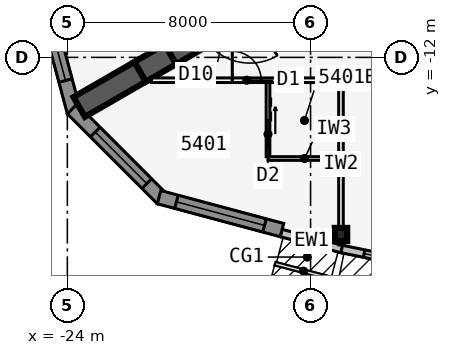
"""IFC4 building model, lengths in metres.
Left out: names, types, materials, properties, quantities, classifications, styles, units other than length and angle.
Written with IfcOpenShell. Run it as: python <this file> out.ifc"""

import sys

from ifc_helpers import new_model, si_unit, direction, frame, frame_2d, origin, origin_2d, place, context, subcontext, project, spatial, polyline, rectangle, i_section, outline, extrude, element, fill, save


model = new_model("IFC4")
c1 = context("Model", 3, precision=1e-05, world=origin(), true_north=direction((0.0, 1.0)))
c2 = subcontext(c1, "Body", "Model", "MODEL_VIEW")
j1 = project(units=[si_unit("LENGTHUNIT", "METRE"), si_unit("PLANEANGLEUNIT", "RADIAN")], contexts=[c1])
p1 = place(None, origin())
s1 = spatial("IfcSite", under=j1, at=p1, CompositionType="ELEMENT")
p2 = place(p1, origin())
s2 = spatial("IfcBuilding", under=s1, at=p2, CompositionType="ELEMENT")
p3 = place(p2, frame((0.0, 0.0, 204.5)))
s3 = spatial("IfcBuildingStorey", under=s2, at=p3, CompositionType="ELEMENT", Elevation=204.5)
p4 = place(p3, frame((-16.5, -9.526, 0.0), z_axis=(0.0, 0.0, 1.0), x_axis=(-0.866031398331, -0.499989616998, 0.0)))
e1 = element("IfcWall", 1, at=p4, inside=s3, PredefinedType="SHEAR", context=c2, shape_type="SweptSolid", body=[
    extrude(rectangle(XDim=4.746, YDim=0.75, at=frame_2d((2.373, 0.0))), origin(), (0.0, 0.0, 1.0), 3.6),
])
p5 = place(p4, frame((1.725, 0.0, 0.0)))
e2 = element("IfcOpeningElement", 2, at=p5, cuts=e1, PredefinedType="OPENING", context=c2, shape_type="SweptSolid", body=[
    extrude(rectangle(XDim=1.8, YDim=2.13, at=frame_2d((0.9, 1.065))), frame((0.0, 0.385, 0.0), z_axis=(0.0, -1.0, 0.0), x_axis=(1.0, 0.0, 0.0)), (0.0, 0.0, 1.0), 0.77),
])
p6 = place(p3, frame((-20.61, -11.899, 0.0), z_axis=(0.0, 0.0, 1.0), x_axis=(-0.866009537788, -0.500027479704, 0.0)))
e3 = element("IfcWall", 3, at=p6, inside=s3, PredefinedType="SHEAR", context=c2, shape_type="SweptSolid", body=[
    extrude(rectangle(XDim=1.155, YDim=0.75, at=frame_2d((0.577, 0.0))), origin(), (0.0, 0.0, 1.0), 3.6),
])
p7 = place(p3, frame((-21.61, -12.477, 0.0), z_axis=(0.0, 0.0, 1.0), x_axis=(-0.866055313784, -0.499948190782, 0.0)))
e4 = element("IfcWall", 4, at=p7, inside=s3, PredefinedType="SHEAR", context=c2, shape_type="SweptSolid", body=[
    extrude(rectangle(XDim=2.309, YDim=0.75, at=frame_2d((1.155, 0.0))), origin(), (0.0, 0.0, 1.0), 3.6),
])
p8 = place(p3, frame((-15.0, -17.825, 0.0), z_axis=(0.0, 0.0, 1.0), x_axis=(1.0, 0.0, 0.0)))
e5 = element("IfcColumn", 5, at=p8, inside=s3, PredefinedType="COLUMN", context=c2, shape_type="SweptSolid", body=[
    extrude(i_section(OverallWidth=0.411, OverallDepth=0.434, WebThickness=0.036, FlangeThickness=0.057, at=origin_2d()), origin(), (0.0, 0.0, 1.0), 3.6),
])
p9 = place(p3, frame((-16.968, -17.777, 0.0), z_axis=(0.0, 0.0, 1.0), x_axis=(0.967010286052, -0.254737328772, 0.0)))
e6 = element("IfcWall", 6, at=p9, inside=s3, PredefinedType="STANDARD", context=c2, shape_type="SweptSolid", body=[
    extrude(rectangle(XDim=2.068, YDim=0.25, at=frame_2d((1.034, 0.0))), origin(), (0.0, 0.0, 1.0), 3.435),
])
p10 = place(p3, frame((-14.975, -18.302, 0.0), z_axis=(0.0, 0.0, 1.0), x_axis=(0.979461488189, -0.201631329795, 0.0)))
e7 = element("IfcWall", 7, at=p10, inside=s3, PredefinedType="STANDARD", context=c2, shape_type="SweptSolid", body=[
    extrude(rectangle(XDim=5.105, YDim=0.25, at=frame_2d((2.552, 0.0))), origin(), (0.0, 0.0, 1.0), 3.435),
])
p11 = place(p10, frame((0.752, 0.0, 0.45)))
e8 = element("IfcOpeningElement", 8, at=p11, cuts=e7, PredefinedType="OPENING", context=c2, shape_type="SweptSolid", body=[
    extrude(rectangle(XDim=3.6, YDim=2.6, at=frame_2d((1.8, 1.3))), frame((0.0, 0.135, 0.0), z_axis=(0.0, -1.0, 0.0), x_axis=(1.0, 0.0, 0.0)), (0.0, 0.0, 1.0), 0.27),
])
p12 = place(p3, frame((-24.865, -9.757, 0.0), z_axis=(0.0, 0.0, 1.0), x_axis=(0.258799282522, -0.96593112144, 0.0)))
e9 = element("IfcWall", 9, at=p12, inside=s3, PredefinedType="SOLIDWALL", context=c2, shape_type="SweptSolid", body=[
    extrude(outline(polyline([(4.184, 0.225), (4.125, 0.225), (3.705, 0.113), (3.675, 0.225), (0.0, 0.225), (0.0, -0.225), (4.184, -0.225), (4.184, 0.225)])), origin(), (0.0, 0.0, 1.0), 3.435),
])
p13 = place(p12, frame((0.713, 0.0, 0.45)))
e10 = element("IfcOpeningElement", 10, at=p13, cuts=e9, PredefinedType="OPENING", context=c2, shape_type="SweptSolid", body=[
    extrude(rectangle(XDim=2.4, YDim=2.6, at=frame_2d((1.2, 1.3))), frame((0.0, 0.235, 0.0), z_axis=(0.0, -1.0, 0.0), x_axis=(1.0, 0.0, 0.0)), (0.0, 0.0, 1.0), 0.47),
])
p14 = place(p3, frame((-23.841, -13.697, 0.0), z_axis=(0.0, 0.0, 1.0), x_axis=(0.707077605902, -0.707135955267, 0.0)))
e11 = element("IfcWall", 11, at=p14, inside=s3, PredefinedType="SOLIDWALL", context=c2, shape_type="SweptSolid", body=[
    extrude(outline(polyline([(4.184, 0.225), (0.509, 0.225), (0.479, 0.113), (0.059, 0.225), (0.0, 0.225), (0.0, -0.225), (4.184, -0.225), (4.184, 0.225)])), origin(), (0.0, 0.0, 1.0), 3.435),
])
p15 = place(p14, frame((1.071, 0.0, 0.45)))
e12 = element("IfcOpeningElement", 12, at=p15, cuts=e11, PredefinedType="OPENING", context=c2, shape_type="SweptSolid", body=[
    extrude(rectangle(XDim=2.4, YDim=2.6, at=frame_2d((1.2, 1.3))), frame((0.0, 0.235, 0.0), z_axis=(0.0, -1.0, 0.0), x_axis=(1.0, 0.0, 0.0)), (0.0, 0.0, 1.0), 0.47),
])
p16 = place(p3, frame((-20.983, -16.598, 0.0), z_axis=(0.0, 0.0, 1.0), x_axis=(0.965920442324, -0.258839137498, 0.0)))
e13 = element("IfcWall", 13, at=p16, inside=s3, PredefinedType="SOLIDWALL", context=c2, shape_type="SweptSolid", body=[
    extrude(rectangle(XDim=4.184, YDim=0.45, at=frame_2d((2.092, 0.0))), origin(), (0.0, 0.0, 1.0), 3.435),
])
p17 = place(p16, frame((0.592, 0.0, 0.45)))
e14 = element("IfcOpeningElement", 14, at=p17, cuts=e13, PredefinedType="OPENING", context=c2, shape_type="SweptSolid", body=[
    extrude(rectangle(XDim=3.0, YDim=2.6, at=frame_2d((1.5, 1.3))), frame((0.0, 0.235, 0.0), z_axis=(0.0, -1.0, 0.0), x_axis=(1.0, 0.0, 0.0)), (0.0, 0.0, 1.0), 0.47),
])
p18 = place(p3, frame((-21.236, -12.751, 0.0), z_axis=(0.0, 0.0, 1.0), x_axis=(1.0, 0.0, 0.0)))
e15 = element("IfcWall", 15, at=p18, inside=s3, PredefinedType="PARTITIONING", context=c2, shape_type="SweptSolid", body=[
    extrude(rectangle(XDim=42.472, YDim=0.15, at=frame_2d((21.236, 0.0))), origin(), (0.0, 0.0, 1.0), 3.435),
])
p19 = place(p18, frame((2.661, 0.0, 0.0)))
e16 = element("IfcOpeningElement", 16, at=p19, cuts=e15, PredefinedType="OPENING", context=c2, shape_type="SweptSolid", body=[
    extrude(rectangle(XDim=0.95, YDim=2.13, at=frame_2d((0.475, 1.065))), frame((0.0, 0.085, 0.0), z_axis=(0.0, -1.0, 0.0), x_axis=(1.0, 0.0, 0.0)), (0.0, 0.0, 1.0), 0.17),
])
p20 = place(p18, frame((8.261, 0.0, 0.0)))
e17 = element("IfcOpeningElement", 17, at=p20, cuts=e15, PredefinedType="OPENING", context=c2, shape_type="SweptSolid", body=[
    extrude(rectangle(XDim=0.95, YDim=2.13, at=frame_2d((0.475, 1.065))), frame((0.0, 0.085, 0.0), z_axis=(0.0, -1.0, 0.0), x_axis=(1.0, 0.0, 0.0)), (0.0, 0.0, 1.0), 0.17),
])
p21 = place(p18, frame((18.861, 0.0, 0.0)))
e18 = element("IfcOpeningElement", 18, at=p21, cuts=e15, PredefinedType="OPENING", context=c2, shape_type="SweptSolid", body=[
    extrude(rectangle(XDim=0.95, YDim=2.13, at=frame_2d((0.475, 1.065))), frame((0.0, 0.085, 0.0), z_axis=(0.0, -1.0, 0.0), x_axis=(1.0, 0.0, 0.0)), (0.0, 0.0, 1.0), 0.17),
])
p22 = place(p18, frame((23.236, 0.0, 0.0)))
e19 = element("IfcOpeningElement", 19, at=p22, cuts=e15, PredefinedType="OPENING", context=c2, shape_type="SweptSolid", body=[
    extrude(rectangle(XDim=1.0, YDim=2.13, at=frame_2d((0.5, 1.065))), frame((0.0, 0.085, 0.0), z_axis=(0.0, -1.0, 0.0), x_axis=(1.0, 0.0, 0.0)), (0.0, 0.0, 1.0), 0.17),
])
p23 = place(p18, frame((29.461, 0.0, 0.0)))
e20 = element("IfcOpeningElement", 20, at=p23, cuts=e15, PredefinedType="OPENING", context=c2, shape_type="SweptSolid", body=[
    extrude(rectangle(XDim=0.95, YDim=2.13, at=frame_2d((0.475, 1.065))), frame((0.0, 0.085, 0.0), z_axis=(0.0, -1.0, 0.0), x_axis=(1.0, 0.0, 0.0)), (0.0, 0.0, 1.0), 0.17),
])
p24 = place(p18, frame((38.861, 0.0, 0.0)))
e21 = element("IfcOpeningElement", 21, at=p24, cuts=e15, PredefinedType="OPENING", context=c2, shape_type="SweptSolid", body=[
    extrude(rectangle(XDim=0.95, YDim=2.13, at=frame_2d((0.475, 1.065))), frame((0.0, 0.085, 0.0), z_axis=(0.0, -1.0, 0.0), x_axis=(1.0, 0.0, 0.0)), (0.0, 0.0, 1.0), 0.17),
])
p25 = place(p3, frame((-15.0, -12.826, 0.0), z_axis=(0.0, 0.0, 1.0), x_axis=(0.0, -1.0, 0.0)))
e22 = element("IfcWall", 22, at=p25, inside=s3, PredefinedType="PARTITIONING", context=c2, shape_type="SweptSolid", body=[
    extrude(rectangle(XDim=5.34, YDim=0.15, at=frame_2d((2.67, 0.0))), origin(), (0.0, 0.0, 1.0), 2.589),
])
p26 = place(p3, frame((-17.4, -15.326, 0.0), z_axis=(0.0, 0.0, 1.0), x_axis=(1.0, 0.0, 0.0)))
e23 = element("IfcWall", 23, at=p26, inside=s3, PredefinedType="PLUMBINGWALL", context=c2, shape_type="SweptSolid", body=[
    extrude(rectangle(XDim=2.4, YDim=0.12, at=frame_2d((1.2, 0.0))), origin(), (0.0, 0.0, 1.0), 3.435),
])
p27 = place(p3, frame((-17.4, -12.826, 0.0), z_axis=(0.0, 0.0, 1.0), x_axis=(0.0, -1.0, 0.0)))
e24 = element("IfcWall", 24, at=p27, inside=s3, PredefinedType="PLUMBINGWALL", context=c2, shape_type="SweptSolid", body=[
    extrude(rectangle(XDim=2.44, YDim=0.12, at=frame_2d((1.22, 0.0))), origin(), (0.0, 0.0, 1.0), 3.435),
])
p28 = place(p27, frame((1.25, 0.0, 0.0)))
e25 = element("IfcOpeningElement", 25, at=p28, cuts=e24, PredefinedType="OPENING", context=c2, shape_type="SweptSolid", body=[
    extrude(rectangle(XDim=0.9, YDim=2.13, at=frame_2d((0.45, 1.065))), frame((0.0, 0.07, 0.0), z_axis=(0.0, -1.0, 0.0), x_axis=(1.0, 0.0, 0.0)), (0.0, 0.0, 1.0), 0.14),
])
p29 = place(p11, origin())
e26 = element("IfcWindow", 26, at=p29, inside=s3, PartitioningType="SINGLE_PANEL", PredefinedType="WINDOW", context=c2, shape_type="SweptSolid", body=[
    extrude(rectangle(XDim=3.6, YDim=2.6, at=frame_2d((1.8, 1.3))), frame((0.0, 0.03, 0.0), z_axis=(0.0, -1.0, 0.0), x_axis=(1.0, 0.0, 0.0)), (0.0, 0.0, 1.0), 0.06),
])
fill(e8, e26)
p30 = place(p13, origin())
e27 = element("IfcWindow", 27, at=p30, inside=s3, PartitioningType="SINGLE_PANEL", PredefinedType="WINDOW", context=c2, shape_type="SweptSolid", body=[
    extrude(rectangle(XDim=2.4, YDim=2.6, at=frame_2d((1.2, 1.3))), frame((0.0, 0.03, 0.0), z_axis=(0.0, -1.0, 0.0), x_axis=(1.0, 0.0, 0.0)), (0.0, 0.0, 1.0), 0.06),
])
fill(e10, e27)
p31 = place(p15, origin())
e28 = element("IfcWindow", 28, at=p31, inside=s3, PartitioningType="SINGLE_PANEL", PredefinedType="WINDOW", context=c2, shape_type="SweptSolid", body=[
    extrude(rectangle(XDim=2.4, YDim=2.6, at=frame_2d((1.2, 1.3))), frame((0.0, 0.03, 0.0), z_axis=(0.0, -1.0, 0.0), x_axis=(1.0, 0.0, 0.0)), (0.0, 0.0, 1.0), 0.06),
])
fill(e12, e28)
p32 = place(p17, origin())
e29 = element("IfcWindow", 29, at=p32, inside=s3, PartitioningType="SINGLE_PANEL", PredefinedType="WINDOW", context=c2, shape_type="SweptSolid", body=[
    extrude(rectangle(XDim=3.0, YDim=2.6, at=frame_2d((1.5, 1.3))), frame((0.0, 0.03, 0.0), z_axis=(0.0, -1.0, 0.0), x_axis=(1.0, 0.0, 0.0)), (0.0, 0.0, 1.0), 0.06),
])
fill(e14, e29)
p33 = place(p28, origin())
e30 = element("IfcDoor", 30, at=p33, inside=s3, OperationType="SLIDING_TO_LEFT", PredefinedType="DOOR", context=c2, shape_type="SweptSolid", body=[
    extrude(rectangle(XDim=0.9, YDim=2.13, at=frame_2d((0.45, 1.065))), frame((0.0, 0.025, 0.0), z_axis=(0.0, -1.0, 0.0), x_axis=(1.0, 0.0, 0.0)), (0.0, 0.0, 1.0), 0.05),
])
fill(e25, e30)
p34 = place(p19, origin())
e31 = element("IfcDoor", 31, at=p34, inside=s3, OperationType="SINGLE_SWING_LEFT", PredefinedType="DOOR", context=c2, shape_type="SweptSolid", body=[
    extrude(rectangle(XDim=0.95, YDim=2.13, at=frame_2d((0.475, 1.065))), frame((0.0, 0.025, 0.0), z_axis=(0.0, -1.0, 0.0), x_axis=(1.0, 0.0, 0.0)), (0.0, 0.0, 1.0), 0.05),
])
fill(e16, e31)
save(model, sys.argv[1])
